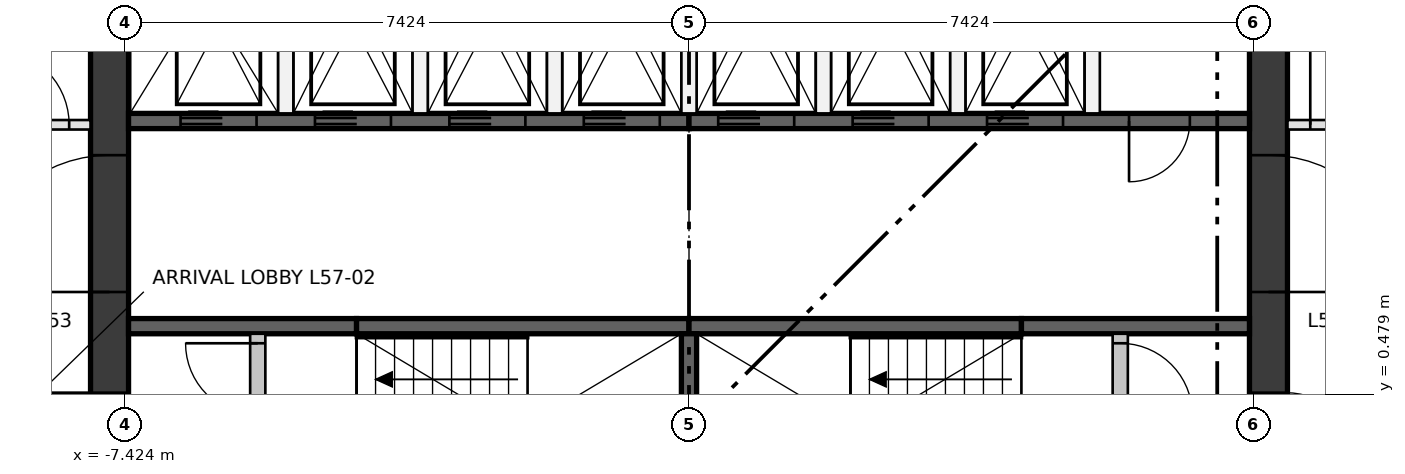
"""IFC4 building model, lengths in metres.
Left out: names, types, materials, properties, quantities, classifications, styles, units other than length and angle.
Written with IfcOpenShell. Run it as: python <this file> out.ifc"""

import sys

from ifc_helpers import new_model, si_unit, direction, frame, frame_2d, origin, place, context, subcontext, project, spatial, rectangle, extrude, element, fill, save


model = new_model("IFC4")
c1 = context("Model", 3, precision=1e-05, world=origin(), true_north=direction((0.0, 1.0)))
c2 = subcontext(c1, "Body", "Model", "MODEL_VIEW")
j1 = project(units=[si_unit("LENGTHUNIT", "METRE"), si_unit("PLANEANGLEUNIT", "RADIAN")], contexts=[c1])
p1 = place(None, origin())
s1 = spatial("IfcSite", under=j1, at=p1, CompositionType="ELEMENT")
p2 = place(p1, origin())
s2 = spatial("IfcBuilding", under=s1, at=p2, CompositionType="ELEMENT")
p3 = place(p2, frame((0.0, 0.0, 211.1)))
s3 = spatial("IfcBuildingStorey", under=s2, at=p3, CompositionType="ELEMENT", Elevation=211.1)
p4 = place(p3, frame((-7.624, -7.374, 0.0), z_axis=(0.0, 0.0, 1.0), x_axis=(0.0, 1.0, 0.0)))
e1 = element("IfcWall", 1, at=p4, inside=s3, PredefinedType="SHEAR", context=c2, shape_type="SweptSolid", body=[
    extrude(rectangle(XDim=14.748, YDim=0.5, at=frame_2d((7.374, 0.0))), origin(), (0.0, 0.0, 1.0), 3.35),
])
p5 = place(p4, frame((6.874, 0.0, 0.0)))
e2 = element("IfcOpeningElement", 2, at=p5, cuts=e1, PredefinedType="OPENING", context=c2, shape_type="SweptSolid", body=[
    extrude(rectangle(XDim=1.0, YDim=2.1, at=frame_2d((0.5, 1.05))), frame((0.0, 0.26, 0.0), z_axis=(0.0, -1.0, 0.0), x_axis=(1.0, 0.0, 0.0)), (0.0, 0.0, 1.0), 0.52),
])
p6 = place(p4, frame((3.75, 0.0, 0.0)))
e3 = element("IfcOpeningElement", 3, at=p6, cuts=e1, PredefinedType="OPENING", context=c2, shape_type="SweptSolid", body=[
    extrude(rectangle(XDim=1.8, YDim=2.1, at=frame_2d((0.9, 1.05))), frame((0.0, 0.26, 0.0), z_axis=(0.0, -1.0, 0.0), x_axis=(1.0, 0.0, 0.0)), (0.0, 0.0, 1.0), 0.52),
])
p7 = place(p4, frame((9.198, 0.0, 0.0)))
e4 = element("IfcOpeningElement", 4, at=p7, cuts=e1, PredefinedType="OPENING", context=c2, shape_type="SweptSolid", body=[
    extrude(rectangle(XDim=1.8, YDim=2.1, at=frame_2d((0.9, 1.05))), frame((0.0, 0.26, 0.0), z_axis=(0.0, -1.0, 0.0), x_axis=(1.0, 0.0, 0.0)), (0.0, 0.0, 1.0), 0.52),
])
p8 = place(p3, frame((7.624, -7.374, 0.0), z_axis=(0.0, 0.0, 1.0), x_axis=(0.0, 1.0, 0.0)))
e5 = element("IfcWall", 5, at=p8, inside=s3, PredefinedType="SHEAR", context=c2, shape_type="SweptSolid", body=[
    extrude(rectangle(XDim=14.748, YDim=0.5, at=frame_2d((7.374, 0.0))), origin(), (0.0, 0.0, 1.0), 3.35),
])
p9 = place(p8, frame((6.874, 0.0, 0.0)))
e6 = element("IfcOpeningElement", 6, at=p9, cuts=e5, PredefinedType="OPENING", context=c2, shape_type="SweptSolid", body=[
    extrude(rectangle(XDim=1.0, YDim=2.1, at=frame_2d((0.5, 1.05))), frame((0.0, 0.26, 0.0), z_axis=(0.0, -1.0, 0.0), x_axis=(1.0, 0.0, 0.0)), (0.0, 0.0, 1.0), 0.52),
])
p10 = place(p8, frame((3.75, 0.0, 0.0)))
e7 = element("IfcOpeningElement", 7, at=p10, cuts=e5, PredefinedType="OPENING", context=c2, shape_type="SweptSolid", body=[
    extrude(rectangle(XDim=1.8, YDim=2.1, at=frame_2d((0.9, 1.05))), frame((0.0, 0.26, 0.0), z_axis=(0.0, -1.0, 0.0), x_axis=(1.0, 0.0, 0.0)), (0.0, 0.0, 1.0), 0.52),
])
p11 = place(p8, frame((9.198, 0.0, 0.0)))
e8 = element("IfcOpeningElement", 8, at=p11, cuts=e5, PredefinedType="OPENING", context=c2, shape_type="SweptSolid", body=[
    extrude(rectangle(XDim=1.8, YDim=2.1, at=frame_2d((0.9, 1.05))), frame((0.0, 0.26, 0.0), z_axis=(0.0, -1.0, 0.0), x_axis=(1.0, 0.0, 0.0)), (0.0, 0.0, 1.0), 0.52),
])
p12 = place(p3, frame((-7.374, 4.074, 0.0), z_axis=(0.0, 0.0, 1.0), x_axis=(1.0, 0.0, 0.0)))
e9 = element("IfcWall", 9, at=p12, inside=s3, PredefinedType="SHEAR", context=c2, shape_type="SweptSolid", body=[
    extrude(rectangle(XDim=7.374, YDim=0.2, at=frame_2d((3.687, 0.0))), origin(), (0.0, 0.0, 1.0), 3.0),
])
p13 = place(p12, frame((0.684, 0.0, 0.0)))
e10 = element("IfcOpeningElement", 10, at=p13, cuts=e9, PredefinedType="OPENING", context=c2, shape_type="SweptSolid", body=[
    extrude(rectangle(XDim=1.0, YDim=2.1, at=frame_2d((0.5, 1.05))), frame((0.0, 0.11, 0.0), z_axis=(0.0, -1.0, 0.0), x_axis=(1.0, 0.0, 0.0)), (0.0, 0.0, 1.0), 0.22),
])
p14 = place(p12, frame((2.453, 0.0, 0.0)))
e11 = element("IfcOpeningElement", 11, at=p14, cuts=e9, PredefinedType="OPENING", context=c2, shape_type="SweptSolid", body=[
    extrude(rectangle(XDim=1.0, YDim=2.1, at=frame_2d((0.5, 1.05))), frame((0.0, 0.11, 0.0), z_axis=(0.0, -1.0, 0.0), x_axis=(1.0, 0.0, 0.0)), (0.0, 0.0, 1.0), 0.22),
])
p15 = place(p12, frame((4.221, 0.0, 0.0)))
e12 = element("IfcOpeningElement", 12, at=p15, cuts=e9, PredefinedType="OPENING", context=c2, shape_type="SweptSolid", body=[
    extrude(rectangle(XDim=1.0, YDim=2.1, at=frame_2d((0.5, 1.05))), frame((0.0, 0.11, 0.0), z_axis=(0.0, -1.0, 0.0), x_axis=(1.0, 0.0, 0.0)), (0.0, 0.0, 1.0), 0.22),
])
p16 = place(p12, frame((5.99, 0.0, 0.0)))
e13 = element("IfcOpeningElement", 13, at=p16, cuts=e9, PredefinedType="OPENING", context=c2, shape_type="SweptSolid", body=[
    extrude(rectangle(XDim=1.0, YDim=2.1, at=frame_2d((0.5, 1.05))), frame((0.0, 0.11, 0.0), z_axis=(0.0, -1.0, 0.0), x_axis=(1.0, 0.0, 0.0)), (0.0, 0.0, 1.0), 0.22),
])
p17 = place(p3, frame((0.0, 4.074, 0.0), z_axis=(0.0, 0.0, 1.0), x_axis=(1.0, 0.0, 0.0)))
e14 = element("IfcWall", 14, at=p17, inside=s3, PredefinedType="SHEAR", context=c2, shape_type="SweptSolid", body=[
    extrude(rectangle(XDim=7.374, YDim=0.2, at=frame_2d((3.687, 0.0))), origin(), (0.0, 0.0, 1.0), 3.0),
])
p18 = place(p17, frame((0.384, 0.0, 0.0)))
e15 = element("IfcOpeningElement", 15, at=p18, cuts=e14, PredefinedType="OPENING", context=c2, shape_type="SweptSolid", body=[
    extrude(rectangle(XDim=1.0, YDim=2.1, at=frame_2d((0.5, 1.05))), frame((0.0, 0.11, 0.0), z_axis=(0.0, -1.0, 0.0), x_axis=(1.0, 0.0, 0.0)), (0.0, 0.0, 1.0), 0.22),
])
p19 = place(p17, frame((2.153, 0.0, 0.0)))
e16 = element("IfcOpeningElement", 16, at=p19, cuts=e14, PredefinedType="OPENING", context=c2, shape_type="SweptSolid", body=[
    extrude(rectangle(XDim=1.0, YDim=2.1, at=frame_2d((0.5, 1.05))), frame((0.0, 0.11, 0.0), z_axis=(0.0, -1.0, 0.0), x_axis=(1.0, 0.0, 0.0)), (0.0, 0.0, 1.0), 0.22),
])
p20 = place(p17, frame((3.921, 0.0, 0.0)))
e17 = element("IfcOpeningElement", 17, at=p20, cuts=e14, PredefinedType="OPENING", context=c2, shape_type="SweptSolid", body=[
    extrude(rectangle(XDim=1.0, YDim=2.1, at=frame_2d((0.5, 1.05))), frame((0.0, 0.11, 0.0), z_axis=(0.0, -1.0, 0.0), x_axis=(1.0, 0.0, 0.0)), (0.0, 0.0, 1.0), 0.22),
])
p21 = place(p17, frame((5.79, 0.0, 0.0)))
e18 = element("IfcOpeningElement", 18, at=p21, cuts=e14, PredefinedType="OPENING", context=c2, shape_type="SweptSolid", body=[
    extrude(rectangle(XDim=0.8, YDim=2.1, at=frame_2d((0.4, 1.05))), frame((0.0, 0.11, 0.0), z_axis=(0.0, -1.0, 0.0), x_axis=(1.0, 0.0, 0.0)), (0.0, 0.0, 1.0), 0.22),
])
p22 = place(p3, frame((-7.374, 1.375, 0.0), z_axis=(0.0, 0.0, 1.0), x_axis=(1.0, 0.0, 0.0)))
e19 = element("IfcWall", 19, at=p22, inside=s3, PredefinedType="SHEAR", context=c2, shape_type="SweptSolid", body=[
    extrude(rectangle(XDim=3.0, YDim=0.2, at=frame_2d((1.5, 0.0))), origin(), (0.0, 0.0, 1.0), 3.0),
])
for number, where, z_axis, x_axis in (
    (20, (-4.374, 1.375, 0.0), (0.0, 0.0, 1.0), (1.0, 0.0, 0.0)),
    (21, (0.0, 1.375, 0.0), (0.0, 0.0, 1.0), (1.0, 0.0, 0.0)),
):
    element("IfcWall", number, at=place(p3, frame(where, z_axis=z_axis, x_axis=x_axis)), inside=s3, PredefinedType="SHEAR", context=c2, shape_type="SweptSolid", body=[
        extrude(rectangle(XDim=4.374, YDim=0.2, at=frame_2d((2.187, 0.0))), origin(), (0.0, 0.0, 1.0), 3.0),
    ])
p23 = place(p3, frame((4.374, 1.375, 0.0), z_axis=(0.0, 0.0, 1.0), x_axis=(1.0, 0.0, 0.0)))
e22 = element("IfcWall", 22, at=p23, inside=s3, PredefinedType="SHEAR", context=c2, shape_type="SweptSolid", body=[
    extrude(rectangle(XDim=3.0, YDim=0.2, at=frame_2d((1.5, 0.0))), origin(), (0.0, 0.0, 1.0), 3.0),
])
p24 = place(p3, frame((0.0, -1.275, 0.0), z_axis=(0.0, 0.0, 1.0), x_axis=(0.0, 1.0, 0.0)))
e23 = element("IfcWall", 23, at=p24, inside=s3, PredefinedType="SHEAR", context=c2, shape_type="SweptSolid", body=[
    extrude(rectangle(XDim=2.55, YDim=0.2, at=frame_2d((1.275, 0.0))), origin(), (0.0, 0.0, 1.0), 3.0),
])
for number, where, z_axis, x_axis in (
    (24, (-5.305, 4.174, 0.0), (0.0, 0.0, 1.0), (0.0, 1.0, 0.0)),
    (25, (-3.537, 4.174, 0.0), (0.0, 0.0, 1.0), (0.0, 1.0, 0.0)),
    (26, (-1.769, 4.174, 0.0), (0.0, 0.0, 1.0), (0.0, 1.0, 0.0)),
    (27, (0.0, 4.174, 0.0), (0.0, 0.0, 1.0), (0.0, 1.0, 0.0)),
    (28, (1.769, 4.174, 0.0), (0.0, 0.0, 1.0), (0.0, 1.0, 0.0)),
    (29, (3.537, 4.174, 0.0), (0.0, 0.0, 1.0), (0.0, 1.0, 0.0)),
    (30, (5.305, 4.174, 0.0), (0.0, 0.0, 1.0), (0.0, 1.0, 0.0)),
):
    element("IfcWall", number, at=place(p3, frame(where, z_axis=z_axis, x_axis=x_axis)), inside=s3, PredefinedType="PARTITIONING", context=c2, shape_type="SweptSolid", body=[
        extrude(rectangle(XDim=3.2, YDim=0.2, at=frame_2d((1.6, 0.0))), origin(), (0.0, 0.0, 1.0), 3.0),
    ])
p25 = place(p3, frame((-5.674, -1.275, 0.0), z_axis=(0.0, 0.0, 1.0), x_axis=(0.0, 1.0, 0.0)))
e31 = element("IfcWall", 31, at=p25, inside=s3, PredefinedType="PARTITIONING", context=c2, shape_type="SweptSolid", body=[
    extrude(rectangle(XDim=2.55, YDim=0.2, at=frame_2d((1.275, 0.0))), origin(), (0.0, 0.0, 1.0), 3.0),
])
p26 = place(p25, frame((0.125, 0.0, 0.0)))
e32 = element("IfcOpeningElement", 32, at=p26, cuts=e31, PredefinedType="OPENING", context=c2, shape_type="SweptSolid", body=[
    extrude(rectangle(XDim=0.95, YDim=2.1, at=frame_2d((0.475, 1.05))), frame((0.0, 0.11, 0.0), z_axis=(0.0, -1.0, 0.0), x_axis=(1.0, 0.0, 0.0)), (0.0, 0.0, 1.0), 0.22),
])
p27 = place(p25, frame((1.475, 0.0, 0.0)))
e33 = element("IfcOpeningElement", 33, at=p27, cuts=e31, PredefinedType="OPENING", context=c2, shape_type="SweptSolid", body=[
    extrude(rectangle(XDim=0.95, YDim=2.1, at=frame_2d((0.475, 1.05))), frame((0.0, 0.11, 0.0), z_axis=(0.0, -1.0, 0.0), x_axis=(1.0, 0.0, 0.0)), (0.0, 0.0, 1.0), 0.22),
])
p28 = place(p3, frame((5.674, -1.275, 0.0), z_axis=(0.0, 0.0, 1.0), x_axis=(0.0, 1.0, 0.0)))
e34 = element("IfcWall", 34, at=p28, inside=s3, PredefinedType="PARTITIONING", context=c2, shape_type="SweptSolid", body=[
    extrude(rectangle(XDim=2.55, YDim=0.2, at=frame_2d((1.275, 0.0))), origin(), (0.0, 0.0, 1.0), 3.0),
])
p29 = place(p28, frame((0.125, 0.0, 0.0)))
e35 = element("IfcOpeningElement", 35, at=p29, cuts=e34, PredefinedType="OPENING", context=c2, shape_type="SweptSolid", body=[
    extrude(rectangle(XDim=0.95, YDim=2.1, at=frame_2d((0.475, 1.05))), frame((0.0, 0.11, 0.0), z_axis=(0.0, -1.0, 0.0), x_axis=(1.0, 0.0, 0.0)), (0.0, 0.0, 1.0), 0.22),
])
p30 = place(p28, frame((1.475, 0.0, 0.0)))
e36 = element("IfcOpeningElement", 36, at=p30, cuts=e34, PredefinedType="OPENING", context=c2, shape_type="SweptSolid", body=[
    extrude(rectangle(XDim=0.95, YDim=2.1, at=frame_2d((0.475, 1.05))), frame((0.0, 0.11, 0.0), z_axis=(0.0, -1.0, 0.0), x_axis=(1.0, 0.0, 0.0)), (0.0, 0.0, 1.0), 0.22),
])
p31 = place(p3, frame((7.874, 4.024, 0.0), z_axis=(0.0, 0.0, 1.0), x_axis=(1.0, 0.0, 0.0)))
e37 = element("IfcWall", 37, at=p31, inside=s3, PredefinedType="PARTITIONING", context=c2, shape_type="SweptSolid", body=[
    extrude(rectangle(XDim=2.475, YDim=0.125, at=frame_2d((1.238, 0.0))), origin(), (0.0, 0.0, 1.0), 3.0),
])
p32 = place(p31, frame((0.3, 0.0, 0.0)))
e38 = element("IfcOpeningElement", 38, at=p32, cuts=e37, PredefinedType="OPENING", context=c2, shape_type="SweptSolid", body=[
    extrude(rectangle(XDim=1.0, YDim=2.1, at=frame_2d((0.5, 1.05))), frame((0.0, 0.073, 0.0), z_axis=(0.0, -1.0, 0.0), x_axis=(1.0, 0.0, 0.0)), (0.0, 0.0, 1.0), 0.145),
])
p33 = place(p3, frame((-9.436, 4.024, 0.0), z_axis=(0.0, 0.0, 1.0), x_axis=(1.0, 0.0, 0.0)))
e39 = element("IfcWall", 39, at=p33, inside=s3, PredefinedType="PARTITIONING", context=c2, shape_type="SweptSolid", body=[
    extrude(rectangle(XDim=1.562, YDim=0.125, at=frame_2d((0.781, 0.0))), origin(), (0.0, 0.0, 1.0), 3.0),
])
p34 = place(p33, frame((0.281, 0.0, 0.0)))
e40 = element("IfcOpeningElement", 40, at=p34, cuts=e39, PredefinedType="OPENING", context=c2, shape_type="SweptSolid", body=[
    extrude(rectangle(XDim=1.0, YDim=2.1, at=frame_2d((0.5, 1.05))), frame((0.0, 0.073, 0.0), z_axis=(0.0, -1.0, 0.0), x_axis=(1.0, 0.0, 0.0)), (0.0, 0.0, 1.0), 0.145),
])
p35 = place(p13, frame((1.0, 0.0, 0.0), z_axis=(0.0, 0.0, 1.0), x_axis=(-1.0, 0.0, 0.0)))
e41 = element("IfcDoor", 41, at=p35, inside=s3, OperationType="DOUBLE_DOOR_SLIDING", PredefinedType="DOOR", context=c2, shape_type="SweptSolid", body=[
    extrude(rectangle(XDim=1.0, YDim=2.1, at=frame_2d((0.5, 1.05))), frame((0.0, 0.025, 0.0), z_axis=(0.0, -1.0, 0.0), x_axis=(1.0, 0.0, 0.0)), (0.0, 0.0, 1.0), 0.05),
])
fill(e10, e41)
p36 = place(p14, frame((1.0, 0.0, 0.0), z_axis=(0.0, 0.0, 1.0), x_axis=(-1.0, 0.0, 0.0)))
e42 = element("IfcDoor", 42, at=p36, inside=s3, OperationType="DOUBLE_DOOR_SLIDING", PredefinedType="DOOR", context=c2, shape_type="SweptSolid", body=[
    extrude(rectangle(XDim=1.0, YDim=2.1, at=frame_2d((0.5, 1.05))), frame((0.0, 0.025, 0.0), z_axis=(0.0, -1.0, 0.0), x_axis=(1.0, 0.0, 0.0)), (0.0, 0.0, 1.0), 0.05),
])
fill(e11, e42)
p37 = place(p15, frame((1.0, 0.0, 0.0), z_axis=(0.0, 0.0, 1.0), x_axis=(-1.0, 0.0, 0.0)))
e43 = element("IfcDoor", 43, at=p37, inside=s3, OperationType="DOUBLE_DOOR_SLIDING", PredefinedType="DOOR", context=c2, shape_type="SweptSolid", body=[
    extrude(rectangle(XDim=1.0, YDim=2.1, at=frame_2d((0.5, 1.05))), frame((0.0, 0.025, 0.0), z_axis=(0.0, -1.0, 0.0), x_axis=(1.0, 0.0, 0.0)), (0.0, 0.0, 1.0), 0.05),
])
fill(e12, e43)
p38 = place(p16, frame((1.0, 0.0, 0.0), z_axis=(0.0, 0.0, 1.0), x_axis=(-1.0, 0.0, 0.0)))
e44 = element("IfcDoor", 44, at=p38, inside=s3, OperationType="DOUBLE_DOOR_SLIDING", PredefinedType="DOOR", context=c2, shape_type="SweptSolid", body=[
    extrude(rectangle(XDim=1.0, YDim=2.1, at=frame_2d((0.5, 1.05))), frame((0.0, 0.025, 0.0), z_axis=(0.0, -1.0, 0.0), x_axis=(1.0, 0.0, 0.0)), (0.0, 0.0, 1.0), 0.05),
])
fill(e13, e44)
p39 = place(p18, frame((1.0, 0.0, 0.0), z_axis=(0.0, 0.0, 1.0), x_axis=(-1.0, 0.0, 0.0)))
e45 = element("IfcDoor", 45, at=p39, inside=s3, OperationType="DOUBLE_DOOR_SLIDING", PredefinedType="DOOR", context=c2, shape_type="SweptSolid", body=[
    extrude(rectangle(XDim=1.0, YDim=2.1, at=frame_2d((0.5, 1.05))), frame((0.0, 0.025, 0.0), z_axis=(0.0, -1.0, 0.0), x_axis=(1.0, 0.0, 0.0)), (0.0, 0.0, 1.0), 0.05),
])
fill(e15, e45)
p40 = place(p19, frame((1.0, 0.0, 0.0), z_axis=(0.0, 0.0, 1.0), x_axis=(-1.0, 0.0, 0.0)))
e46 = element("IfcDoor", 46, at=p40, inside=s3, OperationType="DOUBLE_DOOR_SLIDING", PredefinedType="DOOR", context=c2, shape_type="SweptSolid", body=[
    extrude(rectangle(XDim=1.0, YDim=2.1, at=frame_2d((0.5, 1.05))), frame((0.0, 0.025, 0.0), z_axis=(0.0, -1.0, 0.0), x_axis=(1.0, 0.0, 0.0)), (0.0, 0.0, 1.0), 0.05),
])
fill(e16, e46)
p41 = place(p20, frame((1.0, 0.0, 0.0), z_axis=(0.0, 0.0, 1.0), x_axis=(-1.0, 0.0, 0.0)))
e47 = element("IfcDoor", 47, at=p41, inside=s3, OperationType="DOUBLE_DOOR_SLIDING", PredefinedType="DOOR", context=c2, shape_type="SweptSolid", body=[
    extrude(rectangle(XDim=1.0, YDim=2.1, at=frame_2d((0.5, 1.05))), frame((0.0, 0.025, 0.0), z_axis=(0.0, -1.0, 0.0), x_axis=(1.0, 0.0, 0.0)), (0.0, 0.0, 1.0), 0.05),
])
fill(e17, e47)
p42 = place(p27, origin())
e48 = element("IfcDoor", 48, at=p42, inside=s3, OperationType="SINGLE_SWING_RIGHT", PredefinedType="DOOR", context=c2, shape_type="SweptSolid", body=[
    extrude(rectangle(XDim=0.95, YDim=2.1, at=frame_2d((0.475, 1.05))), frame((0.0, 0.025, 0.0), z_axis=(0.0, -1.0, 0.0), x_axis=(1.0, 0.0, 0.0)), (0.0, 0.0, 1.0), 0.05),
])
fill(e33, e48)
p43 = place(p30, frame((0.95, 0.0, 0.0), z_axis=(0.0, 0.0, 1.0), x_axis=(-1.0, 0.0, 0.0)))
e49 = element("IfcDoor", 49, at=p43, inside=s3, OperationType="SINGLE_SWING_LEFT", PredefinedType="DOOR", context=c2, shape_type="SweptSolid", body=[
    extrude(rectangle(XDim=0.95, YDim=2.1, at=frame_2d((0.475, 1.05))), frame((0.0, 0.025, 0.0), z_axis=(0.0, -1.0, 0.0), x_axis=(1.0, 0.0, 0.0)), (0.0, 0.0, 1.0), 0.05),
])
fill(e36, e49)
p44 = place(p21, frame((0.8, 0.0, 0.0), z_axis=(0.0, 0.0, 1.0), x_axis=(-1.0, 0.0, 0.0)))
e50 = element("IfcDoor", 50, at=p44, inside=s3, OperationType="SINGLE_SWING_LEFT", PredefinedType="DOOR", context=c2, shape_type="SweptSolid", body=[
    extrude(rectangle(XDim=0.8, YDim=2.1, at=frame_2d((0.4, 1.05))), frame((0.0, 0.025, 0.0), z_axis=(0.0, -1.0, 0.0), x_axis=(1.0, 0.0, 0.0)), (0.0, 0.0, 1.0), 0.05),
])
fill(e18, e50)
p45 = place(p5, origin())
e51 = element("IfcDoor", 51, at=p45, inside=s3, OperationType="SINGLE_SWING_RIGHT", PredefinedType="DOOR", context=c2, shape_type="SweptSolid", body=[
    extrude(rectangle(XDim=1.0, YDim=2.1, at=frame_2d((0.5, 1.05))), frame((0.0, 0.25, 0.0), z_axis=(0.0, -1.0, 0.0), x_axis=(1.0, 0.0, 0.0)), (0.0, 0.0, 1.0), 0.05),
])
fill(e2, e51)
p46 = place(p7, origin())
e52 = element("IfcDoor", 52, at=p46, inside=s3, OperationType="DOUBLE_DOOR_SINGLE_SWING", PredefinedType="DOOR", context=c2, shape_type="SweptSolid", body=[
    extrude(rectangle(XDim=1.8, YDim=2.1, at=frame_2d((0.9, 1.05))), frame((0.0, 0.025, 0.0), z_axis=(0.0, -1.0, 0.0), x_axis=(1.0, 0.0, 0.0)), (0.0, 0.0, 1.0), 0.05),
])
fill(e4, e52)
p47 = place(p9, frame((1.0, 0.0, 0.0), z_axis=(0.0, 0.0, 1.0), x_axis=(-1.0, 0.0, 0.0)))
e53 = element("IfcDoor", 53, at=p47, inside=s3, OperationType="SINGLE_SWING_LEFT", PredefinedType="DOOR", context=c2, shape_type="SweptSolid", body=[
    extrude(rectangle(XDim=1.0, YDim=2.1, at=frame_2d((0.5, 1.05))), frame((0.0, 0.25, 0.0), z_axis=(0.0, -1.0, 0.0), x_axis=(1.0, 0.0, 0.0)), (0.0, 0.0, 1.0), 0.05),
])
fill(e6, e53)
p48 = place(p11, frame((1.8, 0.0, 0.0), z_axis=(0.0, 0.0, 1.0), x_axis=(-1.0, 0.0, 0.0)))
e54 = element("IfcDoor", 54, at=p48, inside=s3, OperationType="DOUBLE_DOOR_SINGLE_SWING", PredefinedType="DOOR", context=c2, shape_type="SweptSolid", body=[
    extrude(rectangle(XDim=1.8, YDim=2.1, at=frame_2d((0.9, 1.05))), frame((0.0, 0.025, 0.0), z_axis=(0.0, -1.0, 0.0), x_axis=(1.0, 0.0, 0.0)), (0.0, 0.0, 1.0), 0.05),
])
fill(e8, e54)
p49 = place(p32, origin())
e55 = element("IfcDoor", 55, at=p49, inside=s3, OperationType="SINGLE_SWING_LEFT", PredefinedType="DOOR", context=c2, shape_type="SweptSolid", body=[
    extrude(rectangle(XDim=1.0, YDim=2.1, at=frame_2d((0.5, 1.05))), frame((0.0, 0.025, 0.0), z_axis=(0.0, -1.0, 0.0), x_axis=(1.0, 0.0, 0.0)), (0.0, 0.0, 1.0), 0.05),
])
fill(e38, e55)
p50 = place(p34, origin())
e56 = element("IfcDoor", 56, at=p50, inside=s3, OperationType="SINGLE_SWING_LEFT", PredefinedType="DOOR", context=c2, shape_type="SweptSolid", body=[
    extrude(rectangle(XDim=1.0, YDim=2.1, at=frame_2d((0.5, 1.05))), frame((0.0, 0.025, 0.0), z_axis=(0.0, -1.0, 0.0), x_axis=(1.0, 0.0, 0.0)), (0.0, 0.0, 1.0), 0.05),
])
fill(e40, e56)
save(model, sys.argv[1])
